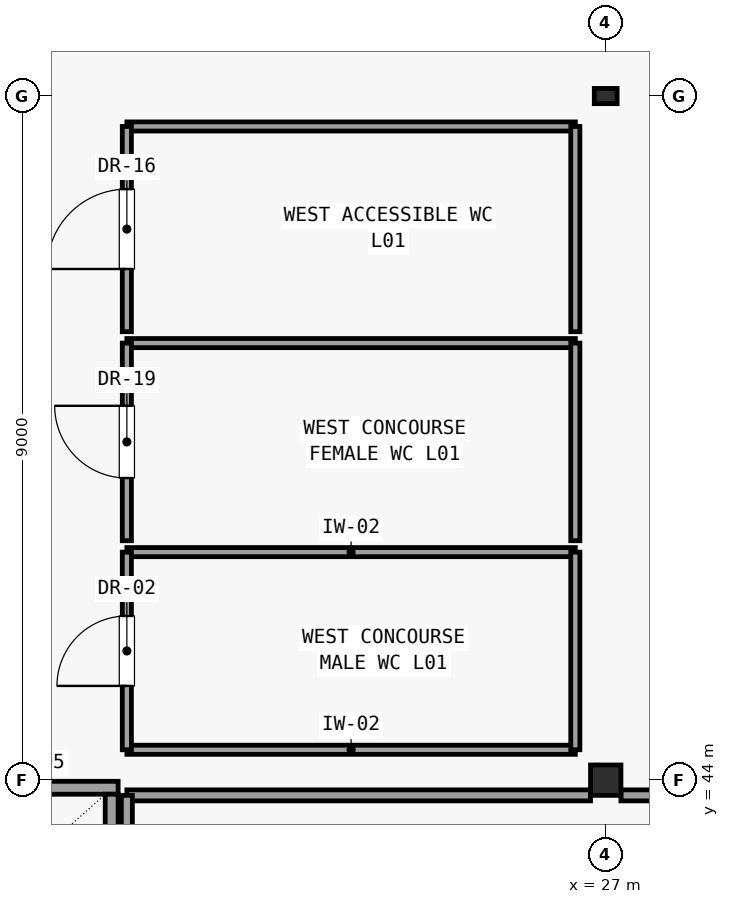
"""IFC4 building model, lengths in metres.
Left out: names, types, materials, properties, quantities, classifications, styles, units other than length and angle.
Written with IfcOpenShell. Run it as: python <this file> out.ifc"""

import sys

from ifc_helpers import new_model, si_unit, direction, frame, frame_2d, origin, origin_2d, place, context, subcontext, project, spatial, rectangle, hollow_rectangle, i_section, extrude, element, fill, save


model = new_model("IFC4")
c1 = context("Model", 3, precision=1e-05, world=origin(), true_north=direction((0.0, 1.0)))
c2 = subcontext(c1, "Body", "Model", "MODEL_VIEW")
j1 = project(units=[si_unit("LENGTHUNIT", "METRE"), si_unit("PLANEANGLEUNIT", "RADIAN")], contexts=[c1])
p1 = place(None, origin())
s1 = spatial("IfcSite", under=j1, at=p1, CompositionType="ELEMENT")
p2 = place(p1, origin())
s2 = spatial("IfcBuilding", under=s1, at=p2, CompositionType="ELEMENT")
p3 = place(p2, frame((0.0, 0.0, 5.1)))
s3 = spatial("IfcBuildingStorey", under=s2, at=p3, CompositionType="ELEMENT", Elevation=5.1)
p4 = place(p3, frame((27.0, 44.0, 0.0), z_axis=(0.0, 0.0, 1.0), x_axis=(1.0, 0.0, 0.0)))
e1 = element("IfcColumn", 1, at=p4, inside=s3, PredefinedType="COLUMN", context=c2, shape_type="SweptSolid", body=[
    extrude(i_section(OverallWidth=0.4, OverallDepth=0.4, WebThickness=0.013, FlangeThickness=0.021, FilletRadius=0.016, at=origin_2d()), origin(), (0.0, 0.0, 1.0), 4.2),
])
p5 = place(p3, frame((27.0, 53.0, 0.0), z_axis=(0.0, 0.0, 1.0), x_axis=(1.0, 0.0, 0.0)))
e2 = element("IfcColumn", 2, at=p5, inside=s3, PredefinedType="COLUMN", context=c2, shape_type="SweptSolid", body=[
    extrude(hollow_rectangle(XDim=0.2, YDim=0.3, WallThickness=0.012, at=origin_2d()), origin(), (0.0, 0.0, 1.0), 4.2),
])
p6 = place(p3, frame((18.415, 43.9, 0.0), z_axis=(0.0, 0.0, 1.0), x_axis=(1.0, 0.0, 0.0)))
e3 = element("IfcWall", 3, at=p6, inside=s3, PredefinedType="PARTITIONING", context=c2, shape_type="SweptSolid", body=[
    extrude(rectangle(XDim=2.17, YDim=0.17, at=frame_2d((1.085, 0.0))), origin(), (0.0, 0.0, 1.0), 3.372),
])
p7 = place(p3, frame((20.5, 42.185, 0.0), z_axis=(0.0, 0.0, 1.0), x_axis=(0.0, 1.0, 0.0)))
e4 = element("IfcWall", 4, at=p7, inside=s3, PredefinedType="PARTITIONING", context=c2, shape_type="SweptSolid", body=[
    extrude(rectangle(XDim=1.63, YDim=0.17, at=frame_2d((0.815, 0.0))), origin(), (0.0, 0.0, 1.0), 3.372),
])
for number, where, z_axis, x_axis in (
    (5, (20.7, 44.4, 0.0), (0.0, 0.0, 1.0), (1.0, 0.0, 0.0)),
    (6, (20.7, 47.0, 0.0), (0.0, 0.0, 1.0), (1.0, 0.0, 0.0)),
):
    element("IfcWall", number, at=place(p3, frame(where, z_axis=z_axis, x_axis=x_axis)), inside=s3, PredefinedType="PARTITIONING", context=c2, shape_type="SweptSolid", body=[
        extrude(rectangle(XDim=5.9, YDim=0.12, at=frame_2d((2.95, 0.0))), origin(), (0.0, 0.0, 1.0), 3.96),
    ])
p8 = place(p3, frame((20.7, 44.4, 0.0), z_axis=(0.0, 0.0, 1.0), x_axis=(0.0, 1.0, 0.0)))
e7 = element("IfcWall", 7, at=p8, inside=s3, PredefinedType="PARTITIONING", context=c2, shape_type="SweptSolid", body=[
    extrude(rectangle(XDim=2.6, YDim=0.12, at=frame_2d((1.3, 0.0))), origin(), (0.0, 0.0, 1.0), 3.96),
])
p9 = place(p8, frame((0.84, 0.0, 0.0)))
e8 = element("IfcOpeningElement", 8, at=p9, cuts=e7, PredefinedType="OPENING", context=c2, shape_type="SweptSolid", body=[
    extrude(rectangle(XDim=0.92, YDim=2.1, at=frame_2d((0.46, 1.05))), frame((0.0, 0.071, 0.0), z_axis=(0.0, -1.0, 0.0), x_axis=(1.0, 0.0, 0.0)), (0.0, 0.0, 1.0), 0.142),
])
p10 = place(p3, frame((26.6, 44.4, 0.0), z_axis=(0.0, 0.0, 1.0), x_axis=(0.0, 1.0, 0.0)))
e9 = element("IfcWall", 9, at=p10, inside=s3, PredefinedType="PARTITIONING", context=c2, shape_type="SweptSolid", body=[
    extrude(rectangle(XDim=2.6, YDim=0.12, at=frame_2d((1.3, 0.0))), origin(), (0.0, 0.0, 1.0), 3.96),
])
p11 = place(p3, frame((20.7, 49.75, 0.0), z_axis=(0.0, 0.0, 1.0), x_axis=(1.0, 0.0, 0.0)))
e10 = element("IfcWall", 10, at=p11, inside=s3, PredefinedType="PARTITIONING", context=c2, shape_type="SweptSolid", body=[
    extrude(rectangle(XDim=5.9, YDim=0.12, at=frame_2d((2.95, 0.0))), origin(), (0.0, 0.0, 1.0), 3.96),
])
p12 = place(p3, frame((20.7, 47.15, 0.0), z_axis=(0.0, 0.0, 1.0), x_axis=(0.0, 1.0, 0.0)))
e11 = element("IfcWall", 11, at=p12, inside=s3, PredefinedType="PARTITIONING", context=c2, shape_type="SweptSolid", body=[
    extrude(rectangle(XDim=2.6, YDim=0.12, at=frame_2d((1.3, 0.0))), origin(), (0.0, 0.0, 1.0), 3.71),
])
p13 = place(p12, frame((0.825, 0.0, 0.0)))
e12 = element("IfcOpeningElement", 12, at=p13, cuts=e11, PredefinedType="OPENING", context=c2, shape_type="SweptSolid", body=[
    extrude(rectangle(XDim=0.95, YDim=2.15, at=frame_2d((0.475, 1.075))), frame((0.0, 0.071, 0.0), z_axis=(0.0, -1.0, 0.0), x_axis=(1.0, 0.0, 0.0)), (0.0, 0.0, 1.0), 0.142),
])
p14 = place(p3, frame((26.6, 47.15, 0.0), z_axis=(0.0, 0.0, 1.0), x_axis=(0.0, 1.0, 0.0)))
e13 = element("IfcWall", 13, at=p14, inside=s3, PredefinedType="PARTITIONING", context=c2, shape_type="SweptSolid", body=[
    extrude(rectangle(XDim=2.6, YDim=0.12, at=frame_2d((1.3, 0.0))), origin(), (0.0, 0.0, 1.0), 3.71),
])
p15 = place(p3, frame((20.7, 52.6, 0.0), z_axis=(0.0, 0.0, 1.0), x_axis=(1.0, 0.0, 0.0)))
e14 = element("IfcWall", 14, at=p15, inside=s3, PredefinedType="PARTITIONING", context=c2, shape_type="SweptSolid", body=[
    extrude(rectangle(XDim=5.9, YDim=0.12, at=frame_2d((2.95, 0.0))), origin(), (0.0, 0.0, 1.0), 3.96),
])
p16 = place(p3, frame((20.7, 49.9, 0.0), z_axis=(0.0, 0.0, 1.0), x_axis=(0.0, 1.0, 0.0)))
e15 = element("IfcWall", 15, at=p16, inside=s3, PredefinedType="PARTITIONING", context=c2, shape_type="SweptSolid", body=[
    extrude(rectangle(XDim=2.7, YDim=0.12, at=frame_2d((1.35, 0.0))), origin(), (0.0, 0.0, 1.0), 3.96),
])
p17 = place(p16, frame((0.825, 0.0, 0.0)))
e16 = element("IfcOpeningElement", 16, at=p17, cuts=e15, PredefinedType="OPENING", context=c2, shape_type="SweptSolid", body=[
    extrude(rectangle(XDim=1.05, YDim=2.2, at=frame_2d((0.525, 1.1))), frame((0.0, 0.071, 0.0), z_axis=(0.0, -1.0, 0.0), x_axis=(1.0, 0.0, 0.0)), (0.0, 0.0, 1.0), 0.142),
])
p18 = place(p3, frame((26.6, 49.9, 0.0), z_axis=(0.0, 0.0, 1.0), x_axis=(0.0, 1.0, 0.0)))
e17 = element("IfcWall", 17, at=p18, inside=s3, PredefinedType="PARTITIONING", context=c2, shape_type="SweptSolid", body=[
    extrude(rectangle(XDim=2.7, YDim=0.12, at=frame_2d((1.35, 0.0))), origin(), (0.0, 0.0, 1.0), 3.96),
])
p19 = place(p3, frame((20.7, 43.8, 0.0), z_axis=(0.0, 0.0, 1.0), x_axis=(1.0, 0.0, 0.0)))
e18 = element("IfcWall", 18, at=p19, inside=s3, PredefinedType="PARTITIONING", context=c2, shape_type="SweptSolid", body=[
    extrude(rectangle(XDim=6.1, YDim=0.145, at=frame_2d((3.05, 0.0))), origin(), (0.0, 0.0, 1.0), 3.372),
])
p20 = place(p3, frame((27.2, 43.8, 0.0), z_axis=(0.0, 0.0, 1.0), x_axis=(1.0, 0.0, 0.0)))
e19 = element("IfcWall", 19, at=p20, inside=s3, PredefinedType="PARTITIONING", context=c2, shape_type="SweptSolid", body=[
    extrude(rectangle(XDim=8.635, YDim=0.145, at=frame_2d((4.317, 0.0))), origin(), (0.0, 0.0, 1.0), 3.372),
])
p21 = place(p3, frame((20.7, 18.2, 0.0), z_axis=(0.0, 0.0, 1.0), x_axis=(0.0, 1.0, 0.0)))
e20 = element("IfcWall", 20, at=p21, inside=s3, PredefinedType="PARTITIONING", context=c2, shape_type="SweptSolid", body=[
    extrude(rectangle(XDim=25.6, YDim=0.145, at=frame_2d((12.8, 0.0))), origin(), (0.0, 0.0, 1.0), 3.372),
])
p22 = place(p21, frame((12.18, 0.0, 0.0)))
e21 = element("IfcOpeningElement", 21, at=p22, cuts=e20, PredefinedType="OPENING", context=c2, shape_type="SweptSolid", body=[
    extrude(rectangle(XDim=2.24, YDim=2.733, at=frame_2d((1.12, 1.366))), frame((0.0, 0.083, 0.0), z_axis=(0.0, -1.0, 0.0), x_axis=(1.0, 0.0, 0.0)), (0.0, 0.0, 1.0), 0.167),
])
p23 = place(p9, origin())
e22 = element("IfcDoor", 22, at=p23, inside=s3, OperationType="SINGLE_SWING_LEFT", PredefinedType="DOOR", context=c2, shape_type="SweptSolid", body=[
    extrude(rectangle(XDim=0.92, YDim=2.1, at=frame_2d((0.46, 1.05))), frame((0.0, 0.025, 0.0), z_axis=(0.0, -1.0, 0.0), x_axis=(1.0, 0.0, 0.0)), (0.0, 0.0, 1.0), 0.05),
])
fill(e8, e22)
p24 = place(p13, origin())
e23 = element("IfcDoor", 23, at=p24, inside=s3, OperationType="SINGLE_SWING_RIGHT", PredefinedType="DOOR", context=c2, shape_type="SweptSolid", body=[
    extrude(rectangle(XDim=0.95, YDim=2.15, at=frame_2d((0.475, 1.075))), frame((0.0, 0.025, 0.0), z_axis=(0.0, -1.0, 0.0), x_axis=(1.0, 0.0, 0.0)), (0.0, 0.0, 1.0), 0.05),
])
fill(e12, e23)
p25 = place(p17, origin())
e24 = element("IfcDoor", 24, at=p25, inside=s3, OperationType="SINGLE_SWING_LEFT", PredefinedType="DOOR", context=c2, shape_type="SweptSolid", body=[
    extrude(rectangle(XDim=1.05, YDim=2.2, at=frame_2d((0.525, 1.1))), frame((0.0, 0.025, 0.0), z_axis=(0.0, -1.0, 0.0), x_axis=(1.0, 0.0, 0.0)), (0.0, 0.0, 1.0), 0.05),
])
fill(e16, e24)
save(model, sys.argv[1])
